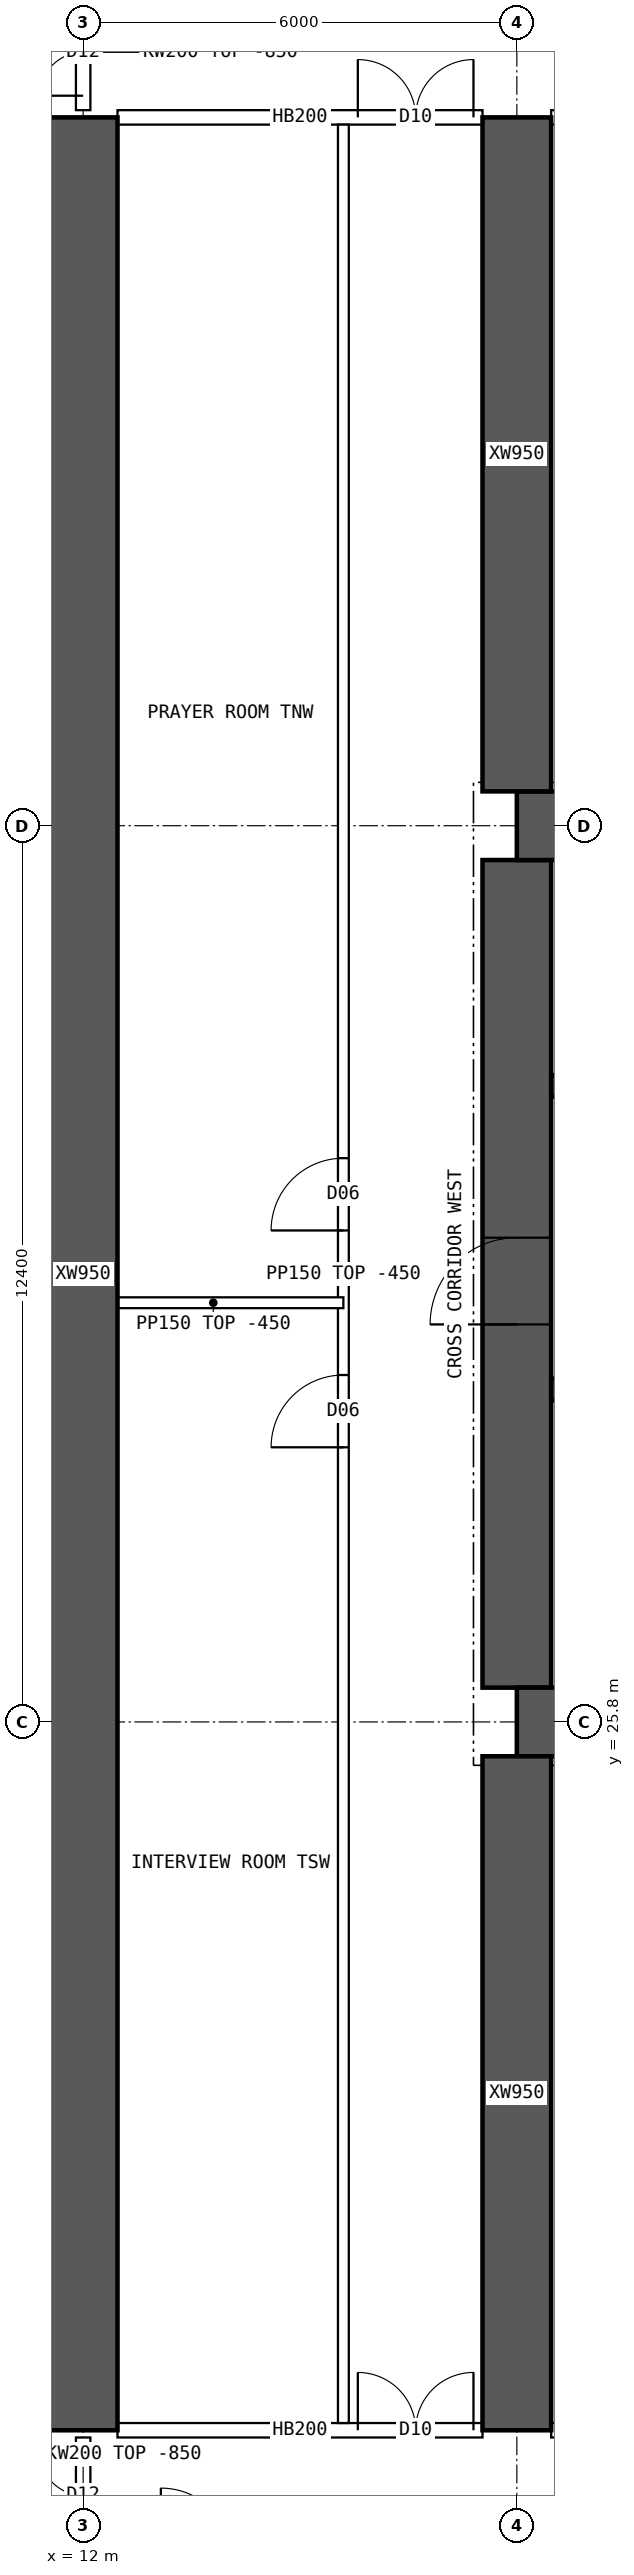
"""IFC4 building model, lengths in metres.
Left out: names, types, materials, properties, quantities, classifications, styles, units other than length and angle.
Written with IfcOpenShell. Run it as: python <this file> out.ifc"""

import sys

from ifc_helpers import new_model, si_unit, direction, frame, frame_2d, origin, place, context, subcontext, project, spatial, polyline, rectangle, outline, extrude, element, fill, save


model = new_model("IFC4")
c1 = context("Model", 3, precision=1e-05, world=origin(), true_north=direction((0.0, 1.0)))
c2 = subcontext(c1, "Body", "Model", "MODEL_VIEW")
j1 = project(units=[si_unit("LENGTHUNIT", "METRE"), si_unit("PLANEANGLEUNIT", "RADIAN")], contexts=[c1])
p1 = place(None, origin())
s1 = spatial("IfcSite", under=j1, at=p1, CompositionType="ELEMENT")
p2 = place(p1, origin())
s2 = spatial("IfcBuilding", under=s1, at=p2, CompositionType="ELEMENT")
p3 = place(p2, frame((0.0, 0.0, 110.65)))
s3 = spatial("IfcBuildingStorey", under=s2, at=p3, CompositionType="ELEMENT", Elevation=110.65)
for number, where, z_axis, x_axis in (
    (1, (18.0, 25.8, 0.0), (0.0, 0.0, 1.0), (1.0, 0.0, 0.0)),
    (2, (18.0, 38.2, 0.0), (0.0, 0.0, 1.0), (1.0, 0.0, 0.0)),
):
    element("IfcWall", number, at=place(p3, frame(where, z_axis=z_axis, x_axis=x_axis)), inside=s3, PredefinedType="SHEAR", context=c2, shape_type="SweptSolid", body=[
        extrude(rectangle(XDim=48.0, YDim=0.95, at=frame_2d((24.0, 0.0))), origin(), (0.0, 0.0, 1.0), 3.75),
    ])
p4 = place(p3, frame((18.0, 26.275, 0.0), z_axis=(0.0, 0.0, 1.0), x_axis=(0.0, 1.0, 0.0)))
e3 = element("IfcWall", 3, at=p4, inside=s3, PredefinedType="SHEAR", context=c2, shape_type="SweptSolid", body=[
    extrude(rectangle(XDim=11.45, YDim=0.95, at=frame_2d((5.725, 0.0))), origin(), (0.0, 0.0, 1.0), 3.75),
])
p5 = place(p4, frame((5.025, 0.0, 0.0)))
e4 = element("IfcOpeningElement", 4, at=p5, cuts=e3, PredefinedType="OPENING", context=c2, shape_type="SweptSolid", body=[
    extrude(rectangle(XDim=1.2, YDim=2.1, at=frame_2d((0.6, 1.05))), frame((0.0, 0.485, 0.0), z_axis=(0.0, -1.0, 0.0), x_axis=(1.0, 0.0, 0.0)), (0.0, 0.0, 1.0), 0.97),
])
p6 = place(p3, frame((18.475, 30.4, 0.0), z_axis=(0.0, 0.0, 1.0), x_axis=(1.0, 0.0, 0.0)))
e5 = element("IfcWall", 5, at=p6, inside=s3, PredefinedType="SHEAR", context=c2, shape_type="SweptSolid", body=[
    extrude(rectangle(XDim=47.05, YDim=0.3, at=frame_2d((23.525, 0.0))), origin(), (0.0, 0.0, 1.0), 3.75),
])
p7 = place(p6, frame((0.4, 0.0, 0.0)))
e6 = element("IfcOpeningElement", 6, at=p7, cuts=e5, PredefinedType="OPENING", context=c2, shape_type="SweptSolid", body=[
    extrude(rectangle(XDim=1.0, YDim=2.1, at=frame_2d((0.5, 1.05))), frame((0.0, 0.16, 0.0), z_axis=(0.0, -1.0, 0.0), x_axis=(1.0, 0.0, 0.0)), (0.0, 0.0, 1.0), 0.32),
])
p8 = place(p6, frame((45.65, 0.0, 0.0)))
e7 = element("IfcOpeningElement", 7, at=p8, cuts=e5, PredefinedType="OPENING", context=c2, shape_type="SweptSolid", body=[
    extrude(rectangle(XDim=1.0, YDim=2.1, at=frame_2d((0.5, 1.05))), frame((0.0, 0.16, 0.0), z_axis=(0.0, -1.0, 0.0), x_axis=(1.0, 0.0, 0.0)), (0.0, 0.0, 1.0), 0.32),
])
p9 = place(p6, frame((8.275, 0.0, 0.0)))
e8 = element("IfcOpeningElement", 8, at=p9, cuts=e5, PredefinedType="OPENING", context=c2, shape_type="SweptSolid", body=[
    extrude(rectangle(XDim=1.1, YDim=2.1, at=frame_2d((0.55, 1.05))), frame((0.0, 0.16, 0.0), z_axis=(0.0, -1.0, 0.0), x_axis=(1.0, 0.0, 0.0)), (0.0, 0.0, 1.0), 0.32),
])
p10 = place(p6, frame((10.875, 0.0, 0.0)))
e9 = element("IfcOpeningElement", 9, at=p10, cuts=e5, PredefinedType="OPENING", context=c2, shape_type="SweptSolid", body=[
    extrude(rectangle(XDim=1.1, YDim=2.1, at=frame_2d((0.55, 1.05))), frame((0.0, 0.16, 0.0), z_axis=(0.0, -1.0, 0.0), x_axis=(1.0, 0.0, 0.0)), (0.0, 0.0, 1.0), 0.32),
])
p11 = place(p6, frame((13.475, 0.0, 0.0)))
e10 = element("IfcOpeningElement", 10, at=p11, cuts=e5, PredefinedType="OPENING", context=c2, shape_type="SweptSolid", body=[
    extrude(rectangle(XDim=1.1, YDim=2.1, at=frame_2d((0.55, 1.05))), frame((0.0, 0.16, 0.0), z_axis=(0.0, -1.0, 0.0), x_axis=(1.0, 0.0, 0.0)), (0.0, 0.0, 1.0), 0.32),
])
p12 = place(p6, frame((16.075, 0.0, 0.0)))
e11 = element("IfcOpeningElement", 11, at=p12, cuts=e5, PredefinedType="OPENING", context=c2, shape_type="SweptSolid", body=[
    extrude(rectangle(XDim=1.1, YDim=2.1, at=frame_2d((0.55, 1.05))), frame((0.0, 0.16, 0.0), z_axis=(0.0, -1.0, 0.0), x_axis=(1.0, 0.0, 0.0)), (0.0, 0.0, 1.0), 0.32),
])
p13 = place(p6, frame((18.85, 0.0, 0.0)))
e12 = element("IfcOpeningElement", 12, at=p13, cuts=e5, PredefinedType="OPENING", context=c2, shape_type="SweptSolid", body=[
    extrude(rectangle(XDim=0.9, YDim=2.1, at=frame_2d((0.45, 1.05))), frame((0.0, 0.16, 0.0), z_axis=(0.0, -1.0, 0.0), x_axis=(1.0, 0.0, 0.0)), (0.0, 0.0, 1.0), 0.32),
])
p14 = place(p6, frame((30.142, 0.0, 0.0)))
e13 = element("IfcOpeningElement", 13, at=p14, cuts=e5, PredefinedType="OPENING", context=c2, shape_type="SweptSolid", body=[
    extrude(rectangle(XDim=1.1, YDim=2.1, at=frame_2d((0.55, 1.05))), frame((0.0, 0.16, 0.0), z_axis=(0.0, -1.0, 0.0), x_axis=(1.0, 0.0, 0.0)), (0.0, 0.0, 1.0), 0.32),
])
p15 = place(p6, frame((33.675, 0.0, 0.0)))
e14 = element("IfcOpeningElement", 14, at=p15, cuts=e5, PredefinedType="OPENING", context=c2, shape_type="SweptSolid", body=[
    extrude(rectangle(XDim=1.1, YDim=2.1, at=frame_2d((0.55, 1.05))), frame((0.0, 0.16, 0.0), z_axis=(0.0, -1.0, 0.0), x_axis=(1.0, 0.0, 0.0)), (0.0, 0.0, 1.0), 0.32),
])
p16 = place(p6, frame((37.208, 0.0, 0.0)))
e15 = element("IfcOpeningElement", 15, at=p16, cuts=e5, PredefinedType="OPENING", context=c2, shape_type="SweptSolid", body=[
    extrude(rectangle(XDim=1.1, YDim=2.1, at=frame_2d((0.55, 1.05))), frame((0.0, 0.16, 0.0), z_axis=(0.0, -1.0, 0.0), x_axis=(1.0, 0.0, 0.0)), (0.0, 0.0, 1.0), 0.32),
])
p17 = place(p3, frame((18.475, 34.6, 0.0), z_axis=(0.0, 0.0, 1.0), x_axis=(1.0, 0.0, 0.0)))
e16 = element("IfcWall", 16, at=p17, inside=s3, PredefinedType="SHEAR", context=c2, shape_type="SweptSolid", body=[
    extrude(rectangle(XDim=47.05, YDim=0.3, at=frame_2d((23.525, 0.0))), origin(), (0.0, 0.0, 1.0), 3.75),
])
p18 = place(p17, frame((0.9, 0.0, 0.0)))
e17 = element("IfcOpeningElement", 17, at=p18, cuts=e16, PredefinedType="OPENING", context=c2, shape_type="SweptSolid", body=[
    extrude(rectangle(XDim=1.1, YDim=2.1, at=frame_2d((0.55, 1.05))), frame((0.0, 0.16, 0.0), z_axis=(0.0, -1.0, 0.0), x_axis=(1.0, 0.0, 0.0)), (0.0, 0.0, 1.0), 0.32),
])
p19 = place(p17, frame((45.05, 0.0, 0.0)))
e18 = element("IfcOpeningElement", 18, at=p19, cuts=e16, PredefinedType="OPENING", context=c2, shape_type="SweptSolid", body=[
    extrude(rectangle(XDim=1.1, YDim=2.1, at=frame_2d((0.55, 1.05))), frame((0.0, 0.16, 0.0), z_axis=(0.0, -1.0, 0.0), x_axis=(1.0, 0.0, 0.0)), (0.0, 0.0, 1.0), 0.32),
])
p20 = place(p17, frame((4.125, 0.0, 0.0)))
e19 = element("IfcOpeningElement", 19, at=p20, cuts=e16, PredefinedType="OPENING", context=c2, shape_type="SweptSolid", body=[
    extrude(rectangle(XDim=0.9, YDim=2.1, at=frame_2d((0.45, 1.05))), frame((0.0, 0.16, 0.0), z_axis=(0.0, -1.0, 0.0), x_axis=(1.0, 0.0, 0.0)), (0.0, 0.0, 1.0), 0.32),
])
p21 = place(p17, frame((42.025, 0.0, 0.0)))
e20 = element("IfcOpeningElement", 20, at=p21, cuts=e16, PredefinedType="OPENING", context=c2, shape_type="SweptSolid", body=[
    extrude(rectangle(XDim=0.9, YDim=2.1, at=frame_2d((0.45, 1.05))), frame((0.0, 0.16, 0.0), z_axis=(0.0, -1.0, 0.0), x_axis=(1.0, 0.0, 0.0)), (0.0, 0.0, 1.0), 0.32),
])
p22 = place(p17, frame((8.9, 0.0, 0.0)))
e21 = element("IfcOpeningElement", 21, at=p22, cuts=e16, PredefinedType="OPENING", context=c2, shape_type="SweptSolid", body=[
    extrude(rectangle(XDim=0.9, YDim=2.1, at=frame_2d((0.45, 1.05))), frame((0.0, 0.16, 0.0), z_axis=(0.0, -1.0, 0.0), x_axis=(1.0, 0.0, 0.0)), (0.0, 0.0, 1.0), 0.32),
])
p23 = place(p17, frame((12.874, 0.0, 0.0)))
e22 = element("IfcOpeningElement", 22, at=p23, cuts=e16, PredefinedType="OPENING", context=c2, shape_type="SweptSolid", body=[
    extrude(rectangle(XDim=0.9, YDim=2.1, at=frame_2d((0.45, 1.05))), frame((0.0, 0.16, 0.0), z_axis=(0.0, -1.0, 0.0), x_axis=(1.0, 0.0, 0.0)), (0.0, 0.0, 1.0), 0.32),
])
p24 = place(p17, frame((16.521, 0.0, 0.0)))
e23 = element("IfcOpeningElement", 23, at=p24, cuts=e16, PredefinedType="OPENING", context=c2, shape_type="SweptSolid", body=[
    extrude(rectangle(XDim=0.9, YDim=2.1, at=frame_2d((0.45, 1.05))), frame((0.0, 0.16, 0.0), z_axis=(0.0, -1.0, 0.0), x_axis=(1.0, 0.0, 0.0)), (0.0, 0.0, 1.0), 0.32),
])
p25 = place(p17, frame((20.28, 0.0, 0.0)))
e24 = element("IfcOpeningElement", 24, at=p25, cuts=e16, PredefinedType="OPENING", context=c2, shape_type="SweptSolid", body=[
    extrude(rectangle(XDim=0.9, YDim=2.1, at=frame_2d((0.45, 1.05))), frame((0.0, 0.16, 0.0), z_axis=(0.0, -1.0, 0.0), x_axis=(1.0, 0.0, 0.0)), (0.0, 0.0, 1.0), 0.32),
])
p26 = place(p17, frame((24.686, 0.0, 0.0)))
e25 = element("IfcOpeningElement", 25, at=p26, cuts=e16, PredefinedType="OPENING", context=c2, shape_type="SweptSolid", body=[
    extrude(rectangle(XDim=0.9, YDim=2.1, at=frame_2d((0.45, 1.05))), frame((0.0, 0.16, 0.0), z_axis=(0.0, -1.0, 0.0), x_axis=(1.0, 0.0, 0.0)), (0.0, 0.0, 1.0), 0.32),
])
p27 = place(p17, frame((27.483, 0.0, 0.0)))
e26 = element("IfcOpeningElement", 26, at=p27, cuts=e16, PredefinedType="OPENING", context=c2, shape_type="SweptSolid", body=[
    extrude(rectangle(XDim=0.9, YDim=2.1, at=frame_2d((0.45, 1.05))), frame((0.0, 0.16, 0.0), z_axis=(0.0, -1.0, 0.0), x_axis=(1.0, 0.0, 0.0)), (0.0, 0.0, 1.0), 0.32),
])
p28 = place(p17, frame((29.856, 0.0, 0.0)))
e27 = element("IfcOpeningElement", 27, at=p28, cuts=e16, PredefinedType="OPENING", context=c2, shape_type="SweptSolid", body=[
    extrude(rectangle(XDim=0.9, YDim=2.1, at=frame_2d((0.45, 1.05))), frame((0.0, 0.16, 0.0), z_axis=(0.0, -1.0, 0.0), x_axis=(1.0, 0.0, 0.0)), (0.0, 0.0, 1.0), 0.32),
])
p29 = place(p17, frame((35.326, 0.0, 0.0)))
e28 = element("IfcOpeningElement", 28, at=p29, cuts=e16, PredefinedType="OPENING", context=c2, shape_type="SweptSolid", body=[
    extrude(rectangle(XDim=0.9, YDim=2.1, at=frame_2d((0.45, 1.05))), frame((0.0, 0.16, 0.0), z_axis=(0.0, -1.0, 0.0), x_axis=(1.0, 0.0, 0.0)), (0.0, 0.0, 1.0), 0.32),
])
p30 = place(p3, frame((12.0, 16.0, 0.0), z_axis=(0.0, 0.0, 1.0), x_axis=(0.0, 1.0, 0.0)))
e29 = element("IfcWall", 29, at=p30, inside=s3, PredefinedType="SHEAR", context=c2, shape_type="SweptSolid", body=[
    extrude(rectangle(XDim=32.0, YDim=0.95, at=frame_2d((16.0, 0.0))), origin(), (0.0, 0.0, 1.0), 3.75),
])
for number, where, z_axis, x_axis in (
    (30, (18.0, 16.0, 0.0), (0.0, 0.0, 1.0), (0.0, 1.0, 0.0)),
    (31, (18.0, 38.675, 0.0), (0.0, 0.0, 1.0), (0.0, 1.0, 0.0)),
):
    element("IfcWall", number, at=place(p3, frame(where, z_axis=z_axis, x_axis=x_axis)), inside=s3, PredefinedType="SHEAR", context=c2, shape_type="SweptSolid", body=[
        extrude(rectangle(XDim=9.325, YDim=0.95, at=frame_2d((4.663, 0.0))), origin(), (0.0, 0.0, 1.0), 3.75),
    ])
p31 = place(p3, frame((12.475, 16.0, 0.0), z_axis=(0.0, 0.0, 1.0), x_axis=(1.0, 0.0, 0.0)))
e32 = element("IfcWall", 32, at=p31, inside=s3, PredefinedType="SOLIDWALL", context=c2, shape_type="SweptSolid", body=[
    extrude(rectangle(XDim=5.05, YDim=0.2, at=frame_2d((2.525, 0.0))), origin(), (0.0, 0.0, 1.0), 3.3),
])
p32 = place(p31, frame((3.325, 0.0, 0.0)))
e33 = element("IfcOpeningElement", 33, at=p32, cuts=e32, PredefinedType="OPENING", context=c2, shape_type="SweptSolid", body=[
    extrude(rectangle(XDim=1.6, YDim=2.1, at=frame_2d((0.8, 1.05))), frame((0.0, 0.11, 0.0), z_axis=(0.0, -1.0, 0.0), x_axis=(1.0, 0.0, 0.0)), (0.0, 0.0, 1.0), 0.22),
])
p33 = place(p3, frame((18.475, 16.0, 0.0), z_axis=(0.0, 0.0, 1.0), x_axis=(1.0, 0.0, 0.0)))
e34 = element("IfcWall", 34, at=p33, inside=s3, PredefinedType="SOLIDWALL", context=c2, shape_type="SweptSolid", body=[
    extrude(rectangle(XDim=5.05, YDim=0.2, at=frame_2d((2.525, 0.0))), origin(), (0.0, 0.0, 1.0), 3.3),
])
p34 = place(p33, frame((0.8, 0.0, 0.0)))
e35 = element("IfcOpeningElement", 35, at=p34, cuts=e34, PredefinedType="OPENING", context=c2, shape_type="SweptSolid", body=[
    extrude(rectangle(XDim=1.0, YDim=2.1, at=frame_2d((0.5, 1.05))), frame((0.0, 0.11, 0.0), z_axis=(0.0, -1.0, 0.0), x_axis=(1.0, 0.0, 0.0)), (0.0, 0.0, 1.0), 0.22),
])
p35 = place(p3, frame((12.475, 48.0, 0.0), z_axis=(0.0, 0.0, 1.0), x_axis=(1.0, 0.0, 0.0)))
e36 = element("IfcWall", 36, at=p35, inside=s3, PredefinedType="SOLIDWALL", context=c2, shape_type="SweptSolid", body=[
    extrude(rectangle(XDim=5.05, YDim=0.2, at=frame_2d((2.525, 0.0))), origin(), (0.0, 0.0, 1.0), 3.3),
])
p36 = place(p35, frame((3.325, 0.0, 0.0)))
e37 = element("IfcOpeningElement", 37, at=p36, cuts=e36, PredefinedType="OPENING", context=c2, shape_type="SweptSolid", body=[
    extrude(rectangle(XDim=1.6, YDim=2.1, at=frame_2d((0.8, 1.05))), frame((0.0, 0.11, 0.0), z_axis=(0.0, -1.0, 0.0), x_axis=(1.0, 0.0, 0.0)), (0.0, 0.0, 1.0), 0.22),
])
p37 = place(p3, frame((18.475, 48.0, 0.0), z_axis=(0.0, 0.0, 1.0), x_axis=(1.0, 0.0, 0.0)))
e38 = element("IfcWall", 38, at=p37, inside=s3, PredefinedType="SOLIDWALL", context=c2, shape_type="SweptSolid", body=[
    extrude(rectangle(XDim=5.05, YDim=0.2, at=frame_2d((2.525, 0.0))), origin(), (0.0, 0.0, 1.0), 3.3),
])
p38 = place(p37, frame((0.8, 0.0, 0.0)))
e39 = element("IfcOpeningElement", 39, at=p38, cuts=e38, PredefinedType="OPENING", context=c2, shape_type="SweptSolid", body=[
    extrude(rectangle(XDim=1.0, YDim=2.1, at=frame_2d((0.5, 1.05))), frame((0.0, 0.11, 0.0), z_axis=(0.0, -1.0, 0.0), x_axis=(1.0, 0.0, 0.0)), (0.0, 0.0, 1.0), 0.22),
])
p39 = place(p3, frame((15.6, 16.1, 0.0), z_axis=(0.0, 0.0, 1.0), x_axis=(0.0, 1.0, 0.0)))
e40 = element("IfcWall", 40, at=p39, inside=s3, PredefinedType="PARTITIONING", context=c2, shape_type="SweptSolid", body=[
    extrude(rectangle(XDim=31.8, YDim=0.15, at=frame_2d((15.9, 0.0))), origin(), (0.0, 0.0, 1.0), 3.3),
])
p40 = place(p39, frame((13.5, 0.0, 0.0)))
e41 = element("IfcOpeningElement", 41, at=p40, cuts=e40, PredefinedType="OPENING", context=c2, shape_type="SweptSolid", body=[
    extrude(rectangle(XDim=1.0, YDim=2.1, at=frame_2d((0.5, 1.05))), frame((0.0, 0.085, 0.0), z_axis=(0.0, -1.0, 0.0), x_axis=(1.0, 0.0, 0.0)), (0.0, 0.0, 1.0), 0.17),
])
p41 = place(p39, frame((16.5, 0.0, 0.0)))
e42 = element("IfcOpeningElement", 42, at=p41, cuts=e40, PredefinedType="OPENING", context=c2, shape_type="SweptSolid", body=[
    extrude(rectangle(XDim=1.0, YDim=2.1, at=frame_2d((0.5, 1.05))), frame((0.0, 0.085, 0.0), z_axis=(0.0, -1.0, 0.0), x_axis=(1.0, 0.0, 0.0)), (0.0, 0.0, 1.0), 0.17),
])
p42 = place(p3, frame((12.0, 31.6, 0.0), z_axis=(0.0, 0.0, 1.0), x_axis=(1.0, 0.0, 0.0)))
e43 = element("IfcWall", 43, at=p42, inside=s3, PredefinedType="PARTITIONING", context=c2, shape_type="SweptSolid", body=[
    extrude(rectangle(XDim=3.6, YDim=0.15, at=frame_2d((1.8, 0.0))), origin(), (0.0, 0.0, 1.0), 3.3),
])
p43 = place(p3, frame((3.905, 30.85, 0.0), z_axis=(0.0, 0.0, 1.0), x_axis=(1.0, 0.0, 0.0)))
e44 = element("IfcWall", 44, at=p43, inside=s3, PredefinedType="PARTITIONING", context=c2, shape_type="SweptSolid", body=[
    extrude(outline(polyline([(0.0, 0.0), (8.02, 0.0), (8.02, 3.3), (2.397, 3.3), (2.395, 2.85), (1.797, 2.85), (1.795, 3.3), (0.0, 3.3), (0.0, 0.0)])), frame((0.0, 0.075, 0.0), z_axis=(0.0, -1.0, 0.0), x_axis=(1.0, 0.0, 0.0)), (0.0, 0.0, 1.0), 0.15),
])
p44 = place(p3, frame((12.0, 14.3, 0.0), z_axis=(0.0, 0.0, 1.0), x_axis=(0.0, 1.0, 0.0)))
e45 = element("IfcWall", 45, at=p44, inside=s3, PredefinedType="SOLIDWALL", context=c2, shape_type="SweptSolid", body=[
    extrude(outline(polyline([(0.0, 0.0), (1.6, 0.0), (1.6, 2.9), (0.0, 2.9), (0.0, 0.0)])), frame((0.0, 0.1, 0.0), z_axis=(0.0, -1.0, 0.0), x_axis=(1.0, 0.0, 0.0)), (0.0, 0.0, 1.0), 0.2),
])
p45 = place(p44, frame((0.2, 0.0, 0.0)))
e46 = element("IfcOpeningElement", 46, at=p45, cuts=e45, PredefinedType="OPENING", context=c2, shape_type="SweptSolid", body=[
    extrude(rectangle(XDim=1.2, YDim=2.1, at=frame_2d((0.6, 1.05))), frame((0.0, 0.11, 0.0), z_axis=(0.0, -1.0, 0.0), x_axis=(1.0, 0.0, 0.0)), (0.0, 0.0, 1.0), 0.22),
])
p46 = place(p3, frame((12.0, 48.1, 0.0), z_axis=(0.0, 0.0, 1.0), x_axis=(0.0, 1.0, 0.0)))
e47 = element("IfcWall", 47, at=p46, inside=s3, PredefinedType="SOLIDWALL", context=c2, shape_type="SweptSolid", body=[
    extrude(outline(polyline([(0.0, 0.0), (1.6, 0.0), (1.6, 2.9), (0.0, 2.9), (0.0, 0.0)])), frame((0.0, 0.1, 0.0), z_axis=(0.0, -1.0, 0.0), x_axis=(1.0, 0.0, 0.0)), (0.0, 0.0, 1.0), 0.2),
])
p47 = place(p46, frame((0.2, 0.0, 0.0)))
e48 = element("IfcOpeningElement", 48, at=p47, cuts=e47, PredefinedType="OPENING", context=c2, shape_type="SweptSolid", body=[
    extrude(rectangle(XDim=1.2, YDim=2.1, at=frame_2d((0.6, 1.05))), frame((0.0, 0.11, 0.0), z_axis=(0.0, -1.0, 0.0), x_axis=(1.0, 0.0, 0.0)), (0.0, 0.0, 1.0), 0.22),
])
p48 = place(p5, origin())
e49 = element("IfcDoor", 49, at=p48, inside=s3, OperationType="SINGLE_SWING_LEFT", PredefinedType="DOOR", context=c2, shape_type="SweptSolid", body=[
    extrude(rectangle(XDim=1.2, YDim=2.1, at=frame_2d((0.6, 1.05))), frame((0.0, 0.025, 0.0), z_axis=(0.0, -1.0, 0.0), x_axis=(1.0, 0.0, 0.0)), (0.0, 0.0, 1.0), 0.05),
])
fill(e4, e49)
p49 = place(p32, origin())
e50 = element("IfcDoor", 50, at=p49, inside=s3, OperationType="DOUBLE_DOOR_SINGLE_SWING", PredefinedType="DOOR", context=c2, shape_type="SweptSolid", body=[
    extrude(rectangle(XDim=1.6, YDim=2.1, at=frame_2d((0.8, 1.05))), frame((0.0, 0.025, 0.0), z_axis=(0.0, -1.0, 0.0), x_axis=(1.0, 0.0, 0.0)), (0.0, 0.0, 1.0), 0.05),
])
fill(e33, e50)
p50 = place(p36, origin())
e51 = element("IfcDoor", 51, at=p50, inside=s3, OperationType="DOUBLE_DOOR_SINGLE_SWING", PredefinedType="DOOR", context=c2, shape_type="SweptSolid", body=[
    extrude(rectangle(XDim=1.6, YDim=2.1, at=frame_2d((0.8, 1.05))), frame((0.0, 0.025, 0.0), z_axis=(0.0, -1.0, 0.0), x_axis=(1.0, 0.0, 0.0)), (0.0, 0.0, 1.0), 0.05),
])
fill(e37, e51)
p51 = place(p40, origin())
e52 = element("IfcDoor", 52, at=p51, inside=s3, OperationType="SINGLE_SWING_LEFT", PredefinedType="DOOR", context=c2, shape_type="SweptSolid", body=[
    extrude(rectangle(XDim=1.0, YDim=2.1, at=frame_2d((0.5, 1.05))), frame((0.0, 0.025, 0.0), z_axis=(0.0, -1.0, 0.0), x_axis=(1.0, 0.0, 0.0)), (0.0, 0.0, 1.0), 0.05),
])
fill(e41, e52)
p52 = place(p41, origin())
e53 = element("IfcDoor", 53, at=p52, inside=s3, OperationType="SINGLE_SWING_LEFT", PredefinedType="DOOR", context=c2, shape_type="SweptSolid", body=[
    extrude(rectangle(XDim=1.0, YDim=2.1, at=frame_2d((0.5, 1.05))), frame((0.0, 0.025, 0.0), z_axis=(0.0, -1.0, 0.0), x_axis=(1.0, 0.0, 0.0)), (0.0, 0.0, 1.0), 0.05),
])
fill(e42, e53)
p53 = place(p45, origin())
e54 = element("IfcDoor", 54, at=p53, inside=s3, OperationType="DOUBLE_DOOR_SINGLE_SWING", PredefinedType="DOOR", context=c2, shape_type="SweptSolid", body=[
    extrude(rectangle(XDim=1.2, YDim=2.1, at=frame_2d((0.6, 1.05))), frame((0.0, 0.025, 0.0), z_axis=(0.0, -1.0, 0.0), x_axis=(1.0, 0.0, 0.0)), (0.0, 0.0, 1.0), 0.05),
])
fill(e46, e54)
p54 = place(p47, origin())
e55 = element("IfcDoor", 55, at=p54, inside=s3, OperationType="DOUBLE_DOOR_SINGLE_SWING", PredefinedType="DOOR", context=c2, shape_type="SweptSolid", body=[
    extrude(rectangle(XDim=1.2, YDim=2.1, at=frame_2d((0.6, 1.05))), frame((0.0, 0.025, 0.0), z_axis=(0.0, -1.0, 0.0), x_axis=(1.0, 0.0, 0.0)), (0.0, 0.0, 1.0), 0.05),
])
fill(e48, e55)
save(model, sys.argv[1])
